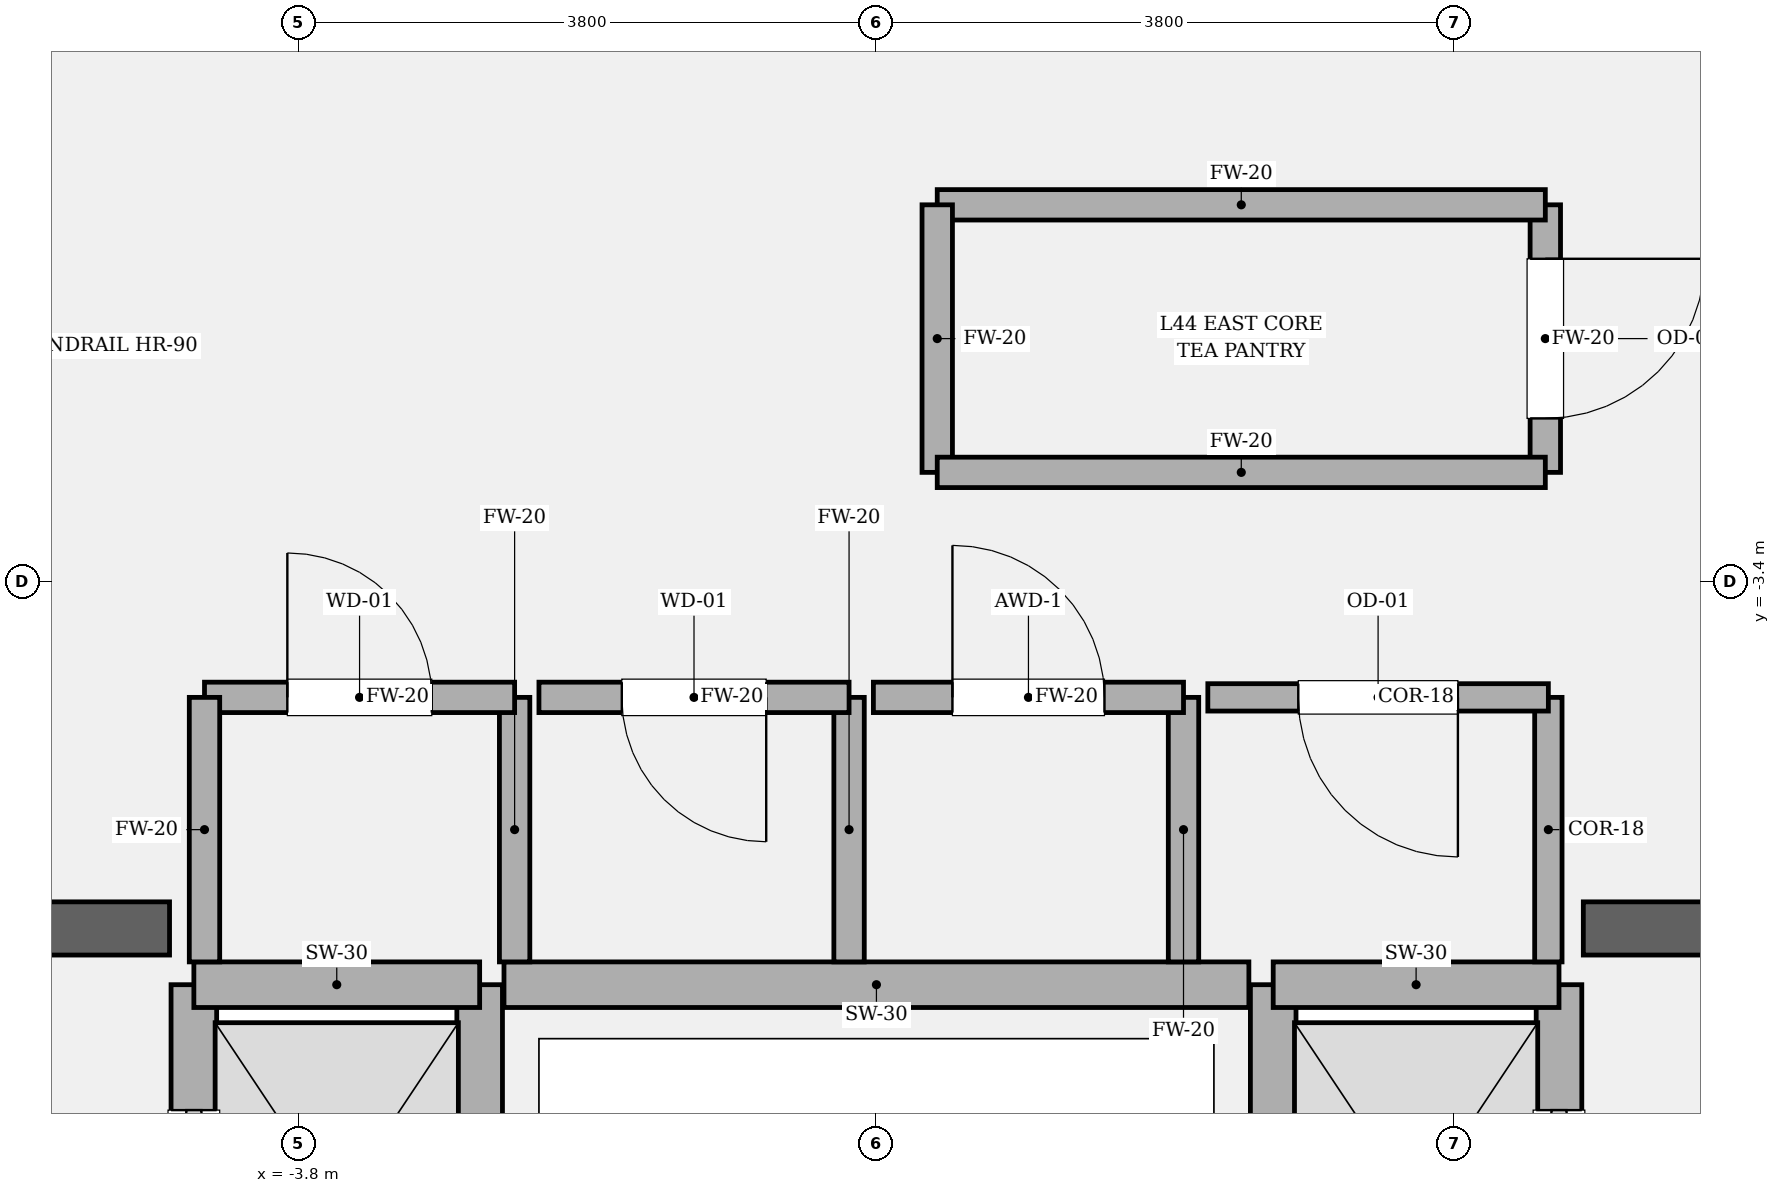
"""IFC4 building model, lengths in metres.
Left out: names, types, materials, properties, quantities, classifications, styles, units other than length and angle.
Written with IfcOpenShell. Run it as: python <this file> out.ifc"""

import sys

from ifc_helpers import new_model, si_unit, direction, frame, frame_2d, origin, place, context, subcontext, project, spatial, rectangle, extrude, element, fill, save


model = new_model("IFC4")
c1 = context("Model", 3, precision=1e-05, world=origin(), true_north=direction((0.0, 1.0)))
c2 = subcontext(c1, "Body", "Model", "MODEL_VIEW")
j1 = project(units=[si_unit("LENGTHUNIT", "METRE"), si_unit("PLANEANGLEUNIT", "RADIAN")], contexts=[c1])
p1 = place(None, origin())
s1 = spatial("IfcSite", under=j1, at=p1, CompositionType="ELEMENT")
p2 = place(p1, origin())
s2 = spatial("IfcBuilding", under=s1, at=p2, CompositionType="ELEMENT")
p3 = place(p2, frame((0.0, 0.0, 188.4)))
s3 = spatial("IfcBuildingStorey", under=s2, at=p3, CompositionType="ELEMENT", Elevation=188.4)
p4 = place(p3, frame((-9.875, -5.68, 0.0), z_axis=(0.0, 0.0, 1.0), x_axis=(1.0, 0.0, 0.0)))
e1 = element("IfcWall", 1, at=p4, inside=s3, PredefinedType="SOLIDWALL", context=c2, shape_type="SweptSolid", body=[
    extrude(rectangle(XDim=5.225, YDim=0.35, at=frame_2d((2.613, 0.0))), origin(), (0.0, 0.0, 1.0), 4.05),
])
p5 = place(p4, frame((1.335, 0.0, 0.0)))
e2 = element("IfcOpeningElement", 2, at=p5, cuts=e1, PredefinedType="OPENING", context=c2, shape_type="SweptSolid", body=[
    extrude(rectangle(XDim=1.18, YDim=2.2, at=frame_2d((0.59, 1.1))), frame((0.0, 0.185, 0.0), z_axis=(0.0, -1.0, 0.0), x_axis=(1.0, 0.0, 0.0)), (0.0, 0.0, 1.0), 0.37),
])
p6 = place(p3, frame((4.65, -5.68, 0.0), z_axis=(0.0, 0.0, 1.0), x_axis=(1.0, 0.0, 0.0)))
e3 = element("IfcWall", 3, at=p6, inside=s3, PredefinedType="SOLIDWALL", context=c2, shape_type="SweptSolid", body=[
    extrude(rectangle(XDim=5.225, YDim=0.35, at=frame_2d((2.613, 0.0))), origin(), (0.0, 0.0, 1.0), 4.05),
])
p7 = place(p6, frame((2.71, 0.0, 0.0)))
e4 = element("IfcOpeningElement", 4, at=p7, cuts=e3, PredefinedType="OPENING", context=c2, shape_type="SweptSolid", body=[
    extrude(rectangle(XDim=1.18, YDim=2.2, at=frame_2d((0.59, 1.1))), frame((0.0, 0.185, 0.0), z_axis=(0.0, -1.0, 0.0), x_axis=(1.0, 0.0, 0.0)), (0.0, 0.0, 1.0), 0.37),
])
p8 = place(p3, frame((-4.49, -8.82, 0.0), z_axis=(0.0, 0.0, 1.0), x_axis=(0.0, 1.0, 0.0)))
e5 = element("IfcWall", 5, at=p8, inside=s3, PredefinedType="SOLIDWALL", context=c2, shape_type="SweptSolid", body=[
    extrude(rectangle(XDim=2.77, YDim=0.3, at=frame_2d((1.385, 0.0))), origin(), (0.0, 0.0, 1.0), 3.83),
])
p9 = place(p8, frame((0.825, 0.0, 0.0)))
e6 = element("IfcOpeningElement", 6, at=p9, cuts=e5, PredefinedType="OPENING", context=c2, shape_type="SweptSolid", body=[
    extrude(rectangle(XDim=1.12, YDim=2.25, at=frame_2d((0.56, 1.125))), frame((0.0, 0.16, 0.0), z_axis=(0.0, -1.0, 0.0), x_axis=(1.0, 0.0, 0.0)), (0.0, 0.0, 1.0), 0.32),
])
p10 = place(p3, frame((-2.61, -8.82, 0.0), z_axis=(0.0, 0.0, 1.0), x_axis=(0.0, 1.0, 0.0)))
e7 = element("IfcWall", 7, at=p10, inside=s3, PredefinedType="SOLIDWALL", context=c2, shape_type="SweptSolid", body=[
    extrude(rectangle(XDim=2.77, YDim=0.3, at=frame_2d((1.385, 0.0))), origin(), (0.0, 0.0, 1.0), 3.83),
])
p11 = place(p3, frame((-4.49, -6.05, 0.0), z_axis=(0.0, 0.0, 1.0), x_axis=(1.0, 0.0, 0.0)))
e8 = element("IfcWall", 8, at=p11, inside=s3, PredefinedType="SOLIDWALL", context=c2, shape_type="SweptSolid", body=[
    extrude(rectangle(XDim=1.88, YDim=0.3, at=frame_2d((0.94, 0.0))), origin(), (0.0, 0.0, 1.0), 3.83),
])
p12 = place(p3, frame((4.49, -8.82, 0.0), z_axis=(0.0, 0.0, 1.0), x_axis=(0.0, 1.0, 0.0)))
e9 = element("IfcWall", 9, at=p12, inside=s3, PredefinedType="SOLIDWALL", context=c2, shape_type="SweptSolid", body=[
    extrude(rectangle(XDim=2.77, YDim=0.3, at=frame_2d((1.385, 0.0))), origin(), (0.0, 0.0, 1.0), 3.83),
])
p13 = place(p12, frame((0.825, 0.0, 0.0)))
e10 = element("IfcOpeningElement", 10, at=p13, cuts=e9, PredefinedType="OPENING", context=c2, shape_type="SweptSolid", body=[
    extrude(rectangle(XDim=1.12, YDim=2.25, at=frame_2d((0.56, 1.125))), frame((0.0, 0.16, 0.0), z_axis=(0.0, -1.0, 0.0), x_axis=(1.0, 0.0, 0.0)), (0.0, 0.0, 1.0), 0.32),
])
p14 = place(p3, frame((2.61, -8.82, 0.0), z_axis=(0.0, 0.0, 1.0), x_axis=(0.0, 1.0, 0.0)))
e11 = element("IfcWall", 11, at=p14, inside=s3, PredefinedType="SOLIDWALL", context=c2, shape_type="SweptSolid", body=[
    extrude(rectangle(XDim=2.77, YDim=0.3, at=frame_2d((1.385, 0.0))), origin(), (0.0, 0.0, 1.0), 3.83),
])
p15 = place(p3, frame((2.61, -6.05, 0.0), z_axis=(0.0, 0.0, 1.0), x_axis=(1.0, 0.0, 0.0)))
e12 = element("IfcWall", 12, at=p15, inside=s3, PredefinedType="SOLIDWALL", context=c2, shape_type="SweptSolid", body=[
    extrude(rectangle(XDim=1.88, YDim=0.3, at=frame_2d((0.94, 0.0))), origin(), (0.0, 0.0, 1.0), 3.83),
])
p16 = place(p3, frame((-2.45, -6.05, 0.0), z_axis=(0.0, 0.0, 1.0), x_axis=(1.0, 0.0, 0.0)))
e13 = element("IfcWall", 13, at=p16, inside=s3, PredefinedType="SOLIDWALL", context=c2, shape_type="SweptSolid", body=[
    extrude(rectangle(XDim=4.9, YDim=0.3, at=frame_2d((2.45, 0.0))), origin(), (0.0, 0.0, 1.0), 3.83),
])
p17 = place(p3, frame((-2.38, -5.9, 0.0), z_axis=(0.0, 0.0, 1.0), x_axis=(0.0, 1.0, 0.0)))
e14 = element("IfcWall", 14, at=p17, inside=s3, PredefinedType="SOLIDWALL", context=c2, shape_type="SweptSolid", body=[
    extrude(rectangle(XDim=1.74, YDim=0.2, at=frame_2d((0.87, 0.0))), origin(), (0.0, 0.0, 1.0), 3.83),
])
p18 = place(p3, frame((-2.38, -4.16, 0.0), z_axis=(0.0, 0.0, 1.0), x_axis=(-1.0, 0.0, 0.0)))
e15 = element("IfcWall", 15, at=p18, inside=s3, PredefinedType="SOLIDWALL", context=c2, shape_type="SweptSolid", body=[
    extrude(rectangle(XDim=2.04, YDim=0.2, at=frame_2d((1.02, 0.0))), origin(), (0.0, 0.0, 1.0), 3.83),
])
p19 = place(p18, frame((0.545, 0.0, 0.0)))
e16 = element("IfcOpeningElement", 16, at=p19, cuts=e15, PredefinedType="OPENING", context=c2, shape_type="SweptSolid", body=[
    extrude(rectangle(XDim=0.95, YDim=2.15, at=frame_2d((0.475, 1.075))), frame((0.0, 0.11, 0.0), z_axis=(0.0, -1.0, 0.0), x_axis=(1.0, 0.0, 0.0)), (0.0, 0.0, 1.0), 0.22),
])
for number, where, z_axis, x_axis in (
    (17, (-4.42, -4.16, 0.0), (0.0, 0.0, 1.0), (0.0, -1.0, 0.0)),
    (18, (-0.18, -5.9, 0.0), (0.0, 0.0, 1.0), (0.0, 1.0, 0.0)),
):
    element("IfcWall", number, at=place(p3, frame(where, z_axis=z_axis, x_axis=x_axis)), inside=s3, PredefinedType="SOLIDWALL", context=c2, shape_type="SweptSolid", body=[
        extrude(rectangle(XDim=1.74, YDim=0.2, at=frame_2d((0.87, 0.0))), origin(), (0.0, 0.0, 1.0), 3.83),
    ])
p20 = place(p3, frame((-0.18, -4.16, 0.0), z_axis=(0.0, 0.0, 1.0), x_axis=(-1.0, 0.0, 0.0)))
e19 = element("IfcWall", 19, at=p20, inside=s3, PredefinedType="SOLIDWALL", context=c2, shape_type="SweptSolid", body=[
    extrude(rectangle(XDim=2.04, YDim=0.2, at=frame_2d((1.02, 0.0))), origin(), (0.0, 0.0, 1.0), 3.83),
])
p21 = place(p20, frame((0.545, 0.0, 0.0)))
e20 = element("IfcOpeningElement", 20, at=p21, cuts=e19, PredefinedType="OPENING", context=c2, shape_type="SweptSolid", body=[
    extrude(rectangle(XDim=0.95, YDim=2.15, at=frame_2d((0.475, 1.075))), frame((0.0, 0.11, 0.0), z_axis=(0.0, -1.0, 0.0), x_axis=(1.0, 0.0, 0.0)), (0.0, 0.0, 1.0), 0.22),
])
p22 = place(p3, frame((2.02, -5.9, 0.0), z_axis=(0.0, 0.0, 1.0), x_axis=(0.0, 1.0, 0.0)))
e21 = element("IfcWall", 21, at=p22, inside=s3, PredefinedType="SOLIDWALL", context=c2, shape_type="SweptSolid", body=[
    extrude(rectangle(XDim=1.74, YDim=0.2, at=frame_2d((0.87, 0.0))), origin(), (0.0, 0.0, 1.0), 3.83),
])
p23 = place(p3, frame((2.02, -4.16, 0.0), z_axis=(0.0, 0.0, 1.0), x_axis=(-1.0, 0.0, 0.0)))
e22 = element("IfcWall", 22, at=p23, inside=s3, PredefinedType="SOLIDWALL", context=c2, shape_type="SweptSolid", body=[
    extrude(rectangle(XDim=2.04, YDim=0.2, at=frame_2d((1.02, 0.0))), origin(), (0.0, 0.0, 1.0), 3.83),
])
p24 = place(p23, frame((0.52, 0.0, 0.0)))
e23 = element("IfcOpeningElement", 23, at=p24, cuts=e22, PredefinedType="OPENING", context=c2, shape_type="SweptSolid", body=[
    extrude(rectangle(XDim=1.0, YDim=2.15, at=frame_2d((0.5, 1.075))), frame((0.0, 0.11, 0.0), z_axis=(0.0, -1.0, 0.0), x_axis=(1.0, 0.0, 0.0)), (0.0, 0.0, 1.0), 0.22),
])
p25 = place(p3, frame((4.42, -5.9, 0.0), z_axis=(0.0, 0.0, 1.0), x_axis=(0.0, 1.0, 0.0)))
e24 = element("IfcWall", 24, at=p25, inside=s3, PredefinedType="PARTITIONING", context=c2, shape_type="SweptSolid", body=[
    extrude(rectangle(XDim=1.74, YDim=0.18, at=frame_2d((0.87, 0.0))), origin(), (0.0, 0.0, 1.0), 3.83),
])
p26 = place(p3, frame((4.42, -4.16, 0.0), z_axis=(0.0, 0.0, 1.0), x_axis=(-1.0, 0.0, 0.0)))
e25 = element("IfcWall", 25, at=p26, inside=s3, PredefinedType="PARTITIONING", context=c2, shape_type="SweptSolid", body=[
    extrude(rectangle(XDim=2.24, YDim=0.18, at=frame_2d((1.12, 0.0))), origin(), (0.0, 0.0, 1.0), 3.83),
])
p27 = place(p26, frame((0.595, 0.0, 0.0)))
e26 = element("IfcOpeningElement", 26, at=p27, cuts=e25, PredefinedType="OPENING", context=c2, shape_type="SweptSolid", body=[
    extrude(rectangle(XDim=1.05, YDim=2.2, at=frame_2d((0.525, 1.1))), frame((0.0, 0.1, 0.0), z_axis=(0.0, -1.0, 0.0), x_axis=(1.0, 0.0, 0.0)), (0.0, 0.0, 1.0), 0.2),
])
p28 = place(p3, frame((4.4, -2.68, 0.0), z_axis=(0.0, 0.0, 1.0), x_axis=(0.0, 1.0, 0.0)))
e27 = element("IfcWall", 27, at=p28, inside=s3, PredefinedType="SOLIDWALL", context=c2, shape_type="SweptSolid", body=[
    extrude(rectangle(XDim=1.76, YDim=0.2, at=frame_2d((0.88, 0.0))), origin(), (0.0, 0.0, 1.0), 3.83),
])
p29 = place(p28, frame((0.355, 0.0, 0.0)))
e28 = element("IfcOpeningElement", 28, at=p29, cuts=e27, PredefinedType="OPENING", context=c2, shape_type="SweptSolid", body=[
    extrude(rectangle(XDim=1.05, YDim=2.2, at=frame_2d((0.525, 1.1))), frame((0.0, 0.11, 0.0), z_axis=(0.0, -1.0, 0.0), x_axis=(1.0, 0.0, 0.0)), (0.0, 0.0, 1.0), 0.22),
])
p30 = place(p3, frame((4.4, -0.92, 0.0), z_axis=(0.0, 0.0, 1.0), x_axis=(-1.0, 0.0, 0.0)))
e29 = element("IfcWall", 29, at=p30, inside=s3, PredefinedType="SOLIDWALL", context=c2, shape_type="SweptSolid", body=[
    extrude(rectangle(XDim=4.0, YDim=0.2, at=frame_2d((2.0, 0.0))), origin(), (0.0, 0.0, 1.0), 3.83),
])
p31 = place(p3, frame((0.4, -0.92, 0.0), z_axis=(0.0, 0.0, 1.0), x_axis=(0.0, -1.0, 0.0)))
e30 = element("IfcWall", 30, at=p31, inside=s3, PredefinedType="SOLIDWALL", context=c2, shape_type="SweptSolid", body=[
    extrude(rectangle(XDim=1.76, YDim=0.2, at=frame_2d((0.88, 0.0))), origin(), (0.0, 0.0, 1.0), 3.83),
])
p32 = place(p3, frame((0.4, -2.68, 0.0), z_axis=(0.0, 0.0, 1.0), x_axis=(1.0, 0.0, 0.0)))
e31 = element("IfcWall", 31, at=p32, inside=s3, PredefinedType="SOLIDWALL", context=c2, shape_type="SweptSolid", body=[
    extrude(rectangle(XDim=4.0, YDim=0.2, at=frame_2d((2.0, 0.0))), origin(), (0.0, 0.0, 1.0), 3.83),
])
p33 = place(p9, origin())
e32 = element("IfcDoor", 32, at=p33, inside=s3, OperationType="SLIDING_TO_LEFT", PredefinedType="DOOR", context=c2, shape_type="SweptSolid", body=[
    extrude(rectangle(XDim=1.12, YDim=2.25, at=frame_2d((0.56, 1.125))), frame((0.0, 0.025, 0.0), z_axis=(0.0, -1.0, 0.0), x_axis=(1.0, 0.0, 0.0)), (0.0, 0.0, 1.0), 0.05),
])
fill(e6, e32)
p34 = place(p13, origin())
e33 = element("IfcDoor", 33, at=p34, inside=s3, OperationType="SLIDING_TO_RIGHT", PredefinedType="DOOR", context=c2, shape_type="SweptSolid", body=[
    extrude(rectangle(XDim=1.12, YDim=2.25, at=frame_2d((0.56, 1.125))), frame((0.0, 0.025, 0.0), z_axis=(0.0, -1.0, 0.0), x_axis=(1.0, 0.0, 0.0)), (0.0, 0.0, 1.0), 0.05),
])
fill(e10, e33)
p35 = place(p19, origin())
e34 = element("IfcDoor", 34, at=p35, inside=s3, OperationType="SINGLE_SWING_RIGHT", PredefinedType="DOOR", context=c2, shape_type="SweptSolid", body=[
    extrude(rectangle(XDim=0.95, YDim=2.15, at=frame_2d((0.475, 1.075))), frame((0.0, 0.025, 0.0), z_axis=(0.0, -1.0, 0.0), x_axis=(1.0, 0.0, 0.0)), (0.0, 0.0, 1.0), 0.05),
])
fill(e16, e34)
p36 = place(p21, origin())
e35 = element("IfcDoor", 35, at=p36, inside=s3, OperationType="SINGLE_SWING_LEFT", PredefinedType="DOOR", context=c2, shape_type="SweptSolid", body=[
    extrude(rectangle(XDim=0.95, YDim=2.15, at=frame_2d((0.475, 1.075))), frame((0.0, 0.025, 0.0), z_axis=(0.0, -1.0, 0.0), x_axis=(1.0, 0.0, 0.0)), (0.0, 0.0, 1.0), 0.05),
])
fill(e20, e35)
p37 = place(p24, origin())
e36 = element("IfcDoor", 36, at=p37, inside=s3, OperationType="SINGLE_SWING_RIGHT", PredefinedType="DOOR", context=c2, shape_type="SweptSolid", body=[
    extrude(rectangle(XDim=1.0, YDim=2.15, at=frame_2d((0.5, 1.075))), frame((0.0, 0.025, 0.0), z_axis=(0.0, -1.0, 0.0), x_axis=(1.0, 0.0, 0.0)), (0.0, 0.0, 1.0), 0.05),
])
fill(e23, e36)
p38 = place(p27, origin())
e37 = element("IfcDoor", 37, at=p38, inside=s3, OperationType="SINGLE_SWING_LEFT", PredefinedType="DOOR", context=c2, shape_type="SweptSolid", body=[
    extrude(rectangle(XDim=1.05, YDim=2.2, at=frame_2d((0.525, 1.1))), frame((0.0, 0.025, 0.0), z_axis=(0.0, -1.0, 0.0), x_axis=(1.0, 0.0, 0.0)), (0.0, 0.0, 1.0), 0.05),
])
fill(e26, e37)
p39 = place(p29, origin())
e38 = element("IfcDoor", 38, at=p39, inside=s3, OperationType="SINGLE_SWING_RIGHT", PredefinedType="DOOR", context=c2, shape_type="SweptSolid", body=[
    extrude(rectangle(XDim=1.05, YDim=2.2, at=frame_2d((0.525, 1.1))), frame((0.0, 0.025, 0.0), z_axis=(0.0, -1.0, 0.0), x_axis=(1.0, 0.0, 0.0)), (0.0, 0.0, 1.0), 0.05),
])
fill(e28, e38)
save(model, sys.argv[1])
